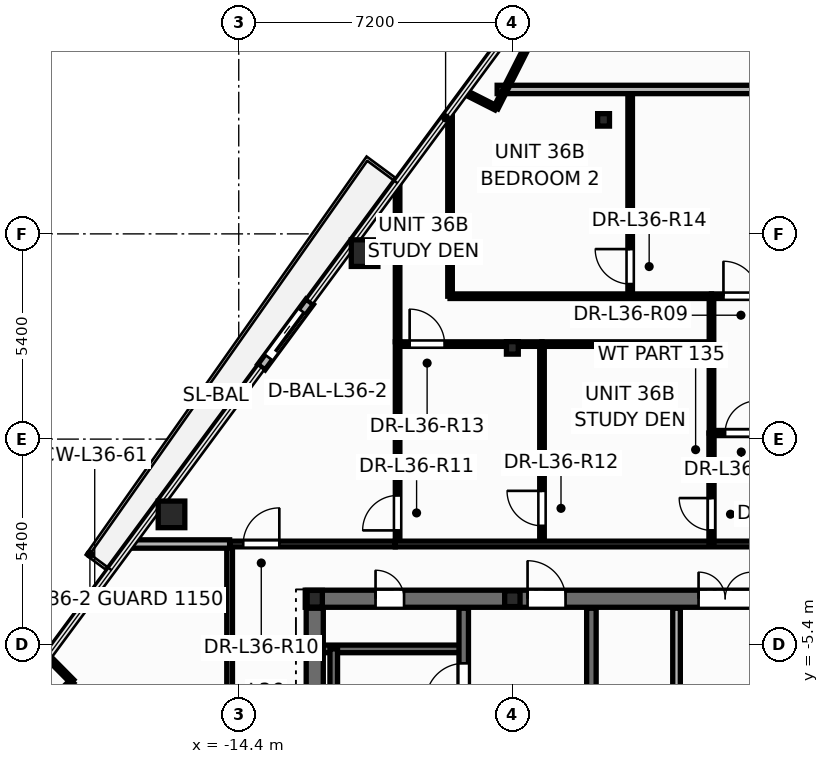
"""IFC4 building model, lengths in metres.
Left out: names, types, materials, properties, quantities, classifications, styles, units other than length and angle.
Written with IfcOpenShell. Run it as: python <this file> out.ifc"""

import sys

from ifc_helpers import new_model, si_unit, direction, frame, frame_2d, origin, origin_2d, place, context, subcontext, project, spatial, rectangle, hollow_circle, i_section, extrude, element, fill, save


model = new_model("IFC4")
c1 = context("Model", 3, precision=1e-05, world=origin(), true_north=direction((0.0, 1.0)))
c2 = subcontext(c1, "Body", "Model", "MODEL_VIEW")
j1 = project(units=[si_unit("LENGTHUNIT", "METRE"), si_unit("PLANEANGLEUNIT", "RADIAN")], contexts=[c1])
p1 = place(None, origin())
s1 = spatial("IfcSite", under=j1, at=p1, CompositionType="ELEMENT")
p2 = place(p1, origin())
s2 = spatial("IfcBuilding", under=s1, at=p2, CompositionType="ELEMENT")
p3 = place(p2, frame((0.0, 0.0, 140.1)))
s3 = spatial("IfcBuildingStorey", under=s2, at=p3, CompositionType="ELEMENT", Elevation=140.1)
for number, where, z_axis, x_axis in (
    (1, (-11.089, 4.894, 0.0), (0.0, 0.0, 1.0), (1.0, 0.0, 0.0)),
    (2, (-16.169, -1.98, 0.0), (0.0, 0.0, 1.0), (1.0, 0.0, 0.0)),
):
    element("IfcColumn", number, at=place(p3, frame(where, z_axis=z_axis, x_axis=x_axis)), inside=s3, PredefinedType="COLUMN", context=c2, shape_type="SweptSolid", body=[
        extrude(hollow_circle(Radius=0.35, WallThickness=0.03, at=origin_2d()), origin(), (0.0, 0.0, 1.0), 3.6),
    ])
p4 = place(p3, frame((-12.4, -4.2, 0.0), z_axis=(0.0, 0.0, 1.0), x_axis=(1.0, 0.0, 0.0)))
e3 = element("IfcColumn", 3, at=p4, inside=s3, PredefinedType="COLUMN", context=c2, shape_type="SweptSolid", body=[
    extrude(i_section(OverallWidth=0.4, OverallDepth=0.44, WebThickness=0.028, FlangeThickness=0.04, at=origin_2d()), origin(), (0.0, 0.0, 1.0), 3.6),
])
p5 = place(p3, frame((-7.2, -4.2, 0.0), z_axis=(0.0, 0.0, 1.0), x_axis=(1.0, 0.0, 0.0)))
e4 = element("IfcColumn", 4, at=p5, inside=s3, PredefinedType="PILASTER", context=c2, shape_type="SweptSolid", body=[
    extrude(i_section(OverallWidth=0.405, OverallDepth=0.414, WebThickness=0.022, FlangeThickness=0.032, at=origin_2d()), origin(), (0.0, 0.0, 1.0), 3.6),
])
for number, where, z_axis, x_axis in (
    (5, (-7.2, 2.4, 0.0), (0.0, 0.0, 1.0), (1.0, 0.0, 0.0)),
    (6, (-4.8, 8.4, 0.0), (0.0, 0.0, 1.0), (1.0, 0.0, 0.0)),
):
    element("IfcColumn", number, at=place(p3, frame(where, z_axis=z_axis, x_axis=x_axis)), inside=s3, PredefinedType="COLUMN", context=c2, shape_type="SweptSolid", body=[
        extrude(i_section(OverallWidth=0.311, OverallDepth=0.327, WebThickness=0.016, FlangeThickness=0.025, at=origin_2d()), origin(), (0.0, 0.0, 1.0), 3.6),
    ])
p6 = place(p3, frame((-12.532, 3.614, -0.015), z_axis=(0.0, 0.0, 1.0), x_axis=(-0.594381437757, -0.804183254271, 0.0)))
e7 = element("IfcWall", 7, at=p6, inside=s3, PredefinedType="STANDARD", context=c2, shape_type="SweptSolid", body=[
    extrude(rectangle(XDim=2.14, YDim=0.24, at=frame_2d((1.07, 0.0))), origin(), (0.0, 0.0, 1.0), 2.807),
])
p7 = place(p6, frame((0.32, 0.0, 0.015)))
e8 = element("IfcOpeningElement", 8, at=p7, cuts=e7, PredefinedType="OPENING", context=c2, shape_type="SweptSolid", body=[
    extrude(rectangle(XDim=1.506, YDim=2.204, at=frame_2d((0.75, 1.102))), frame((0.0, 0.13, 0.0), z_axis=(0.0, -1.0, 0.0), x_axis=(1.0, 0.0, 0.0)), (0.0, 0.0, 1.0), 0.26),
])
p8 = place(p3, frame((-12.65, -4.2, 0.0), z_axis=(0.0, 0.0, 1.0), x_axis=(1.0, 0.0, 0.0)))
e9 = element("IfcWall", 9, at=p8, inside=s3, PredefinedType="SHEAR", context=c2, shape_type="SweptSolid", body=[
    extrude(rectangle(XDim=25.3, YDim=0.45, at=frame_2d((12.65, 0.0))), origin(), (0.0, 0.0, 1.0), 3.6),
])
p9 = place(p8, frame((1.85, 0.0, 0.0)))
e10 = element("IfcOpeningElement", 10, at=p9, cuts=e9, PredefinedType="OPENING", context=c2, shape_type="SweptSolid", body=[
    extrude(rectangle(XDim=0.756, YDim=2.054, at=frame_2d((0.375, 1.027))), frame((0.0, 0.235, 0.0), z_axis=(0.0, -1.0, 0.0), x_axis=(1.0, 0.0, 0.0)), (0.0, 0.0, 1.0), 0.47),
])
p10 = place(p8, frame((22.65, 0.0, 0.0)))
e11 = element("IfcOpeningElement", 11, at=p10, cuts=e9, PredefinedType="OPENING", context=c2, shape_type="SweptSolid", body=[
    extrude(rectangle(XDim=0.756, YDim=2.054, at=frame_2d((0.375, 1.027))), frame((0.0, 0.235, 0.0), z_axis=(0.0, -1.0, 0.0), x_axis=(1.0, 0.0, 0.0)), (0.0, 0.0, 1.0), 0.47),
])
p11 = place(p8, frame((5.85, 0.0, 0.0)))
e12 = element("IfcOpeningElement", 12, at=p11, cuts=e9, PredefinedType="OPENING", context=c2, shape_type="SweptSolid", body=[
    extrude(rectangle(XDim=1.006, YDim=2.104, at=frame_2d((0.5, 1.052))), frame((0.0, 0.235, 0.0), z_axis=(0.0, -1.0, 0.0), x_axis=(1.0, 0.0, 0.0)), (0.0, 0.0, 1.0), 0.47),
])
p12 = place(p8, frame((10.35, 0.0, 0.0)))
e13 = element("IfcOpeningElement", 13, at=p12, cuts=e9, PredefinedType="OPENING", context=c2, shape_type="SweptSolid", body=[
    extrude(rectangle(XDim=1.406, YDim=2.154, at=frame_2d((0.7, 1.077))), frame((0.0, 0.235, 0.0), z_axis=(0.0, -1.0, 0.0), x_axis=(1.0, 0.0, 0.0)), (0.0, 0.0, 1.0), 0.47),
])
p13 = place(p8, frame((18.45, 0.0, 0.0)))
e14 = element("IfcOpeningElement", 14, at=p13, cuts=e9, PredefinedType="OPENING", context=c2, shape_type="SweptSolid", body=[
    extrude(rectangle(XDim=1.006, YDim=2.104, at=frame_2d((0.5, 1.052))), frame((0.0, 0.235, 0.0), z_axis=(0.0, -1.0, 0.0), x_axis=(1.0, 0.0, 0.0)), (0.0, 0.0, 1.0), 0.47),
])
p14 = place(p3, frame((-12.35, -5.52, 0.0), z_axis=(0.0, 0.0, 1.0), x_axis=(1.0, 0.0, 0.0)))
e15 = element("IfcWall", 15, at=p14, inside=s3, PredefinedType="SOLIDWALL", context=c2, shape_type="SweptSolid", body=[
    extrude(rectangle(XDim=3.87, YDim=0.2, at=frame_2d((1.935, 0.0))), origin(), (0.0, 0.0, 1.0), 3.6),
])
p15 = place(p3, frame((-11.9, -13.1, 0.0), z_axis=(0.0, 0.0, 1.0), x_axis=(0.0, 1.0, 0.0)))
e16 = element("IfcWall", 16, at=p15, inside=s3, PredefinedType="SOLIDWALL", context=c2, shape_type="SweptSolid", body=[
    extrude(rectangle(XDim=7.58, YDim=0.2, at=frame_2d((3.79, 0.0))), origin(), (0.0, 0.0, 1.0), 3.6),
])
p16 = place(p3, frame((-8.48, -13.85, 0.0), z_axis=(0.0, 0.0, 1.0), x_axis=(0.0, 1.0, 0.0)))
e17 = element("IfcWall", 17, at=p16, inside=s3, PredefinedType="SHEAR", context=c2, shape_type="SweptSolid", body=[
    extrude(rectangle(XDim=9.4, YDim=0.25, at=frame_2d((4.7, 0.0))), origin(), (0.0, 0.0, 1.0), 3.6),
])
p17 = place(p16, frame((6.95, 0.0, 0.0)))
e18 = element("IfcOpeningElement", 18, at=p17, cuts=e17, PredefinedType="OPENING", context=c2, shape_type="SweptSolid", body=[
    extrude(rectangle(XDim=1.006, YDim=2.104, at=frame_2d((0.5, 1.052))), frame((0.0, 0.135, 0.0), z_axis=(0.0, -1.0, 0.0), x_axis=(1.0, 0.0, 0.0)), (0.0, 0.0, 1.0), 0.27),
])
p18 = place(p3, frame((-5.12, -13.85, 0.0), z_axis=(0.0, 0.0, 1.0), x_axis=(0.0, 1.0, 0.0)))
e19 = element("IfcWall", 19, at=p18, inside=s3, PredefinedType="SHEAR", context=c2, shape_type="SweptSolid", body=[
    extrude(rectangle(XDim=9.4, YDim=0.25, at=frame_2d((4.7, 0.0))), origin(), (0.0, 0.0, 1.0), 3.6),
])
p19 = place(p3, frame((-12.4, -13.85, 0.0), z_axis=(0.0, 0.0, 1.0), x_axis=(0.0, 1.0, 0.0)))
e20 = element("IfcWall", 20, at=p19, inside=s3, PredefinedType="SHEAR", context=c2, shape_type="SweptSolid", body=[
    extrude(rectangle(XDim=9.4, YDim=0.45, at=frame_2d((4.7, 0.0))), origin(), (0.0, 0.0, 1.0), 3.6),
])
p20 = place(p3, frame((-2.88, -9.45, 0.0), z_axis=(0.0, 0.0, 1.0), x_axis=(0.0, 1.0, 0.0)))
e21 = element("IfcWall", 21, at=p20, inside=s3, PredefinedType="SOLIDWALL", context=c2, shape_type="SweptSolid", body=[
    extrude(rectangle(XDim=5.0, YDim=0.2, at=frame_2d((2.5, 0.0))), origin(), (0.0, 0.0, 1.0), 3.35),
])
p21 = place(p20, frame((2.05, 0.0, 0.0)))
e22 = element("IfcOpeningElement", 22, at=p21, cuts=e21, PredefinedType="OPENING", context=c2, shape_type="SweptSolid", body=[
    extrude(rectangle(XDim=0.926, YDim=2.104, at=frame_2d((0.46, 1.052))), frame((0.0, 0.11, 0.0), z_axis=(0.0, -1.0, 0.0), x_axis=(1.0, 0.0, 0.0)), (0.0, 0.0, 1.0), 0.22),
])
p22 = place(p3, frame((-14.64, -10.8, 0.0), z_axis=(0.0, 0.0, 1.0), x_axis=(0.0, 1.0, 0.0)))
e23 = element("IfcWall", 23, at=p22, inside=s3, PredefinedType="PARTITIONING", context=c2, shape_type="SweptSolid", body=[
    extrude(rectangle(XDim=8.04, YDim=0.15, at=frame_2d((4.02, 0.0))), origin(), (0.0, 0.0, 1.0), 2.325),
])
p23 = place(p22, frame((0.359, 0.0, 0.0)))
e24 = element("IfcOpeningElement", 24, at=p23, cuts=e23, PredefinedType="OPENING", context=c2, shape_type="SweptSolid", body=[
    extrude(rectangle(XDim=0.956, YDim=2.104, at=frame_2d((0.475, 1.052))), frame((0.0, 0.085, 0.0), z_axis=(0.0, -1.0, 0.0), x_axis=(1.0, 0.0, 0.0)), (0.0, 0.0, 1.0), 0.17),
])
p24 = place(p3, frame((-4.1, 3.76, 0.0), z_axis=(0.0, 0.0, 1.0), x_axis=(0.0, 1.0, 0.0)))
e25 = element("IfcWall", 25, at=p24, inside=s3, PredefinedType="PARTITIONING", context=c2, shape_type="SweptSolid", body=[
    extrude(rectangle(XDim=5.44, YDim=0.12, at=frame_2d((2.72, 0.0))), origin(), (0.0, 0.0, 1.0), 2.325),
])
p25 = place(p24, frame((0.32, 0.0, 0.0)))
e26 = element("IfcOpeningElement", 26, at=p25, cuts=e25, PredefinedType="OPENING", context=c2, shape_type="SweptSolid", body=[
    extrude(rectangle(XDim=0.926, YDim=2.104, at=frame_2d((0.46, 1.052))), frame((0.0, 0.07, 0.0), z_axis=(0.0, -1.0, 0.0), x_axis=(1.0, 0.0, 0.0)), (0.0, 0.0, 1.0), 0.14),
])
p26 = place(p3, frame((-10.22, -2.76, 0.0), z_axis=(0.0, 0.0, 1.0), x_axis=(0.0, 1.0, 0.0)))
e27 = element("IfcWall", 27, at=p26, inside=s3, PredefinedType="PARTITIONING", context=c2, shape_type="SweptSolid", body=[
    extrude(rectangle(XDim=5.32, YDim=0.12, at=frame_2d((2.66, 0.0))), origin(), (0.0, 0.0, 1.0), 2.325),
])
p27 = place(p26, frame((0.358, 0.0, 0.0)))
e28 = element("IfcOpeningElement", 28, at=p27, cuts=e27, PredefinedType="OPENING", context=c2, shape_type="SweptSolid", body=[
    extrude(rectangle(XDim=0.926, YDim=2.104, at=frame_2d((0.46, 1.052))), frame((0.0, 0.07, 0.0), z_axis=(0.0, -1.0, 0.0), x_axis=(1.0, 0.0, 0.0)), (0.0, 0.0, 1.0), 0.14),
])
p28 = place(p3, frame((-6.42, -2.76, 0.0), z_axis=(0.0, 0.0, 1.0), x_axis=(0.0, 1.0, 0.0)))
e29 = element("IfcWall", 29, at=p28, inside=s3, PredefinedType="PARTITIONING", context=c2, shape_type="SweptSolid", body=[
    extrude(rectangle(XDim=5.26, YDim=0.12, at=frame_2d((2.63, 0.0))), origin(), (0.0, 0.0, 1.0), 2.325),
])
p29 = place(p28, frame((0.478, 0.0, 0.0)))
e30 = element("IfcOpeningElement", 30, at=p29, cuts=e29, PredefinedType="OPENING", context=c2, shape_type="SweptSolid", body=[
    extrude(rectangle(XDim=0.926, YDim=2.104, at=frame_2d((0.46, 1.052))), frame((0.0, 0.07, 0.0), z_axis=(0.0, -1.0, 0.0), x_axis=(1.0, 0.0, 0.0)), (0.0, 0.0, 1.0), 0.14),
])
p30 = place(p3, frame((-8.84, 3.76, 0.0), z_axis=(0.0, 0.0, 1.0), x_axis=(0.0, 1.0, 0.0)))
e31 = element("IfcWall", 31, at=p30, inside=s3, PredefinedType="PARTITIONING", context=c2, shape_type="SweptSolid", body=[
    extrude(rectangle(XDim=4.849, YDim=0.12, at=frame_2d((2.425, 0.0))), origin(), (0.0, 0.0, 1.0), 2.325),
])
p31 = place(p3, frame((-8.84, 3.76, 0.0), z_axis=(0.0, 0.0, 1.0), x_axis=(1.0, 0.0, 0.0)))
e32 = element("IfcWall", 32, at=p31, inside=s3, PredefinedType="PARTITIONING", context=c2, shape_type="SweptSolid", body=[
    extrude(rectangle(XDim=6.88, YDim=0.12, at=frame_2d((3.44, 0.0))), origin(), (0.0, 0.0, 1.0), 2.325),
])
p32 = place(p3, frame((-7.6, 9.2, 0.0), z_axis=(0.0, 0.0, 1.0), x_axis=(1.0, 0.0, 0.0)))
e33 = element("IfcWall", 33, at=p32, inside=s3, PredefinedType="PARTITIONING", context=c2, shape_type="SweptSolid", body=[
    extrude(rectangle(XDim=8.24, YDim=0.22, at=frame_2d((4.12, 0.0))), origin(), (0.0, 0.0, 1.0), 2.325),
])
p33 = place(p3, frame((-10.28, -2.76, 0.0), z_axis=(0.0, 0.0, 1.0), x_axis=(1.0, 0.0, 0.0)))
e34 = element("IfcWall", 34, at=p33, inside=s3, PredefinedType="PARTITIONING", context=c2, shape_type="SweptSolid", body=[
    extrude(rectangle(XDim=10.92, YDim=0.15, at=frame_2d((5.46, 0.0))), origin(), (0.0, 0.0, 1.0), 2.325),
])
p34 = place(p3, frame((-14.64, -2.76, 0.0), z_axis=(0.0, 0.0, 1.0), x_axis=(1.0, 0.0, 0.0)))
e35 = element("IfcWall", 35, at=p34, inside=s3, PredefinedType="PARTITIONING", context=c2, shape_type="SweptSolid", body=[
    extrude(rectangle(XDim=4.358, YDim=0.15, at=frame_2d((2.179, 0.0))), origin(), (0.0, 0.0, 1.0), 3.35),
])
p35 = place(p34, frame((0.358, 0.0, 0.0)))
e36 = element("IfcOpeningElement", 36, at=p35, cuts=e35, PredefinedType="OPENING", context=c2, shape_type="SweptSolid", body=[
    extrude(rectangle(XDim=0.956, YDim=2.104, at=frame_2d((0.475, 1.052))), frame((0.0, 0.085, 0.0), z_axis=(0.0, -1.0, 0.0), x_axis=(1.0, 0.0, 0.0)), (0.0, 0.0, 1.0), 0.17),
])
p36 = place(p3, frame((-6.42, 2.5, 0.0), z_axis=(0.0, 0.0, 1.0), x_axis=(1.0, 0.0, 0.0)))
e37 = element("IfcWall", 37, at=p36, inside=s3, PredefinedType="PARTITIONING", context=c2, shape_type="SweptSolid", body=[
    extrude(rectangle(XDim=4.46, YDim=0.12, at=frame_2d((2.23, 0.0))), origin(), (0.0, 0.0, 1.0), 2.325),
])
p37 = place(p3, frame((-10.22, 2.562, 0.0), z_axis=(0.0, 0.0, 1.0), x_axis=(0.0, 1.0, 0.0)))
e38 = element("IfcWall", 38, at=p37, inside=s3, PredefinedType="PARTITIONING", context=c2, shape_type="SweptSolid", body=[
    extrude(rectangle(XDim=4.18, YDim=0.12, at=frame_2d((2.09, 0.0))), origin(), (0.0, 0.0, 1.0), 2.325),
])
p38 = place(p3, frame((-10.22, 2.5, 0.0), z_axis=(0.0, 0.0, 1.0), x_axis=(1.0, 0.0, 0.0)))
e39 = element("IfcWall", 39, at=p38, inside=s3, PredefinedType="PARTITIONING", context=c2, shape_type="SweptSolid", body=[
    extrude(rectangle(XDim=3.8, YDim=0.12, at=frame_2d((1.9, 0.0))), origin(), (0.0, 0.0, 1.0), 2.325),
])
p39 = place(p38, frame((0.317, 0.0, 0.0)))
e40 = element("IfcOpeningElement", 40, at=p39, cuts=e39, PredefinedType="OPENING", context=c2, shape_type="SweptSolid", body=[
    extrude(rectangle(XDim=0.926, YDim=2.104, at=frame_2d((0.46, 1.052))), frame((0.0, 0.07, 0.0), z_axis=(0.0, -1.0, 0.0), x_axis=(1.0, 0.0, 0.0)), (0.0, 0.0, 1.0), 0.14),
])
p40 = place(p3, frame((-1.96, -2.76, 0.0), z_axis=(0.0, 0.0, 1.0), x_axis=(0.0, 1.0, 0.0)))
e41 = element("IfcWall", 41, at=p40, inside=s3, PredefinedType="PARTITIONING", context=c2, shape_type="SweptSolid", body=[
    extrude(rectangle(XDim=2.92, YDim=0.135, at=frame_2d((1.46, 0.0))), origin(), (0.0, 0.0, 1.0), 3.35),
])
p41 = place(p40, frame((0.359, 0.0, 0.0)))
e42 = element("IfcOpeningElement", 42, at=p41, cuts=e41, PredefinedType="OPENING", context=c2, shape_type="SweptSolid", body=[
    extrude(rectangle(XDim=0.856, YDim=2.104, at=frame_2d((0.425, 1.052))), frame((0.0, 0.078, 0.0), z_axis=(0.0, -1.0, 0.0), x_axis=(1.0, 0.0, 0.0)), (0.0, 0.0, 1.0), 0.155),
])
p42 = place(p3, frame((-17.243, -2.76, 0.0), z_axis=(0.0, 0.0, 1.0), x_axis=(1.0, 0.0, 0.0)))
e43 = element("IfcWall", 43, at=p42, inside=s3, PredefinedType="PARTITIONING", context=c2, shape_type="SweptSolid", body=[
    extrude(rectangle(XDim=2.603, YDim=0.22, at=frame_2d((1.301, 0.0))), origin(), (0.0, 0.0, 1.0), 2.792),
])
p43 = place(p3, frame((-1.96, 0.16, 0.0), z_axis=(0.0, 0.0, 1.0), x_axis=(1.0, 0.0, 0.0)))
e44 = element("IfcWall", 44, at=p43, inside=s3, PredefinedType="PARTITIONING", context=c2, shape_type="SweptSolid", body=[
    extrude(rectangle(XDim=2.6, YDim=0.135, at=frame_2d((1.3, 0.0))), origin(), (0.0, 0.0, 1.0), 2.325),
])
p44 = place(p43, frame((0.358, 0.0, 0.0)))
e45 = element("IfcOpeningElement", 45, at=p44, cuts=e44, PredefinedType="OPENING", context=c2, shape_type="SweptSolid", body=[
    extrude(rectangle(XDim=0.856, YDim=2.104, at=frame_2d((0.425, 1.052))), frame((0.0, 0.078, 0.0), z_axis=(0.0, -1.0, 0.0), x_axis=(1.0, 0.0, 0.0)), (0.0, 0.0, 1.0), 0.155),
])
p45 = place(p3, frame((-1.96, 3.76, 0.0), z_axis=(0.0, 0.0, 1.0), x_axis=(1.0, 0.0, 0.0)))
e46 = element("IfcWall", 46, at=p45, inside=s3, PredefinedType="PARTITIONING", context=c2, shape_type="SweptSolid", body=[
    extrude(rectangle(XDim=2.6, YDim=0.12, at=frame_2d((1.3, 0.0))), origin(), (0.0, 0.0, 1.0), 2.325),
])
p46 = place(p45, frame((0.315, 0.0, 0.0)))
e47 = element("IfcOpeningElement", 47, at=p46, cuts=e46, PredefinedType="OPENING", context=c2, shape_type="SweptSolid", body=[
    extrude(rectangle(XDim=0.926, YDim=2.104, at=frame_2d((0.46, 1.052))), frame((0.0, 0.07, 0.0), z_axis=(0.0, -1.0, 0.0), x_axis=(1.0, 0.0, 0.0)), (0.0, 0.0, 1.0), 0.14),
])
p47 = place(p3, frame((-1.96, 0.16, 0.0), z_axis=(0.0, 0.0, 1.0), x_axis=(0.0, 1.0, 0.0)))
e48 = element("IfcWall", 48, at=p47, inside=s3, PredefinedType="PARTITIONING", context=c2, shape_type="SweptSolid", body=[
    extrude(rectangle(XDim=3.6, YDim=0.12, at=frame_2d((1.8, 0.0))), origin(), (0.0, 0.0, 1.0), 2.325),
])
p48 = place(p3, frame((-18.784, -6.374, 0.0), z_axis=(0.0, 0.0, 1.0), x_axis=(-0.71069096923, -0.70350433279, 0.0)))
e49 = element("IfcWall", 49, at=p48, inside=s3, PredefinedType="PARTITIONING", context=c2, shape_type="SweptSolid", body=[
    extrude(rectangle(XDim=2.174, YDim=0.12, at=frame_2d((1.087, 0.0))), origin(), (0.0, 0.0, 1.0), 3.35),
])
p49 = place(p3, frame((-6.702, 10.553, 0.0), z_axis=(0.0, 0.0, 1.0), x_axis=(-0.451617656026, -0.892211573992, 0.0)))
e50 = element("IfcWall", 50, at=p49, inside=s3, PredefinedType="PARTITIONING", context=c2, shape_type="SweptSolid", body=[
    extrude(rectangle(XDim=2.06, YDim=0.12, at=frame_2d((1.03, 0.0))), origin(), (0.0, 0.0, 1.0), 3.35),
])
p50 = place(p3, frame((-7.632, 8.716, 0.0), z_axis=(0.0, 0.0, 1.0), x_axis=(-0.892273316606, 0.451495657202, 0.0)))
e51 = element("IfcWall", 51, at=p50, inside=s3, PredefinedType="PARTITIONING", context=c2, shape_type="SweptSolid", body=[
    extrude(rectangle(XDim=0.911, YDim=0.12, at=frame_2d((0.456, 0.0))), origin(), (0.0, 0.0, 1.0), 2.792),
])
p51 = place(p3, frame((-19.424, -5.728, 0.0), z_axis=(0.0, 0.0, 1.0), x_axis=(0.703469957503, -0.710724995262, 0.0)))
e52 = element("IfcWall", 52, at=p51, inside=s3, PredefinedType="PARTITIONING", context=c2, shape_type="SweptSolid", body=[
    extrude(rectangle(XDim=0.909, YDim=0.12, at=frame_2d((0.454, 0.0))), origin(), (0.0, 0.0, 1.0), 2.792),
])
p52 = place(p7, origin())
e53 = element("IfcDoor", 53, at=p52, inside=s3, OperationType="SLIDING_TO_RIGHT", PredefinedType="DOOR", context=c2, shape_type="SweptSolid", body=[
    extrude(rectangle(XDim=1.5, YDim=2.2, at=frame_2d((0.75, 1.1))), frame((0.0, 0.025, 0.0), z_axis=(0.0, -1.0, 0.0), x_axis=(1.0, 0.0, 0.0)), (0.0, 0.0, 1.0), 0.05),
])
fill(e8, e53)
p53 = place(p17, origin())
e54 = element("IfcDoor", 54, at=p53, inside=s3, OperationType="SINGLE_SWING_LEFT", PredefinedType="DOOR", context=c2, shape_type="SweptSolid", body=[
    extrude(rectangle(XDim=1.0, YDim=2.1, at=frame_2d((0.5, 1.05))), frame((0.0, 0.025, 0.0), z_axis=(0.0, -1.0, 0.0), x_axis=(1.0, 0.0, 0.0)), (0.0, 0.0, 1.0), 0.05),
])
fill(e18, e54)
p54 = place(p9, origin())
e55 = element("IfcDoor", 55, at=p54, inside=s3, OperationType="SINGLE_SWING_LEFT", PredefinedType="DOOR", context=c2, shape_type="SweptSolid", body=[
    extrude(rectangle(XDim=0.75, YDim=2.05, at=frame_2d((0.375, 1.025))), frame((0.0, 0.025, 0.0), z_axis=(0.0, -1.0, 0.0), x_axis=(1.0, 0.0, 0.0)), (0.0, 0.0, 1.0), 0.05),
])
fill(e10, e55)
p55 = place(p11, origin())
e56 = element("IfcDoor", 56, at=p55, inside=s3, OperationType="SINGLE_SWING_LEFT", PredefinedType="DOOR", context=c2, shape_type="SweptSolid", body=[
    extrude(rectangle(XDim=1.0, YDim=2.1, at=frame_2d((0.5, 1.05))), frame((0.0, 0.025, 0.0), z_axis=(0.0, -1.0, 0.0), x_axis=(1.0, 0.0, 0.0)), (0.0, 0.0, 1.0), 0.05),
])
fill(e12, e56)
p56 = place(p12, origin())
e57 = element("IfcDoor", 57, at=p56, inside=s3, OperationType="DOUBLE_DOOR_SINGLE_SWING", PredefinedType="DOOR", context=c2, shape_type="SweptSolid", body=[
    extrude(rectangle(XDim=1.4, YDim=2.15, at=frame_2d((0.7, 1.075))), frame((0.0, 0.025, 0.0), z_axis=(0.0, -1.0, 0.0), x_axis=(1.0, 0.0, 0.0)), (0.0, 0.0, 1.0), 0.05),
])
fill(e13, e57)
p57 = place(p44, origin())
e58 = element("IfcDoor", 58, at=p57, inside=s3, OperationType="SINGLE_SWING_RIGHT", PredefinedType="DOOR", context=c2, shape_type="SweptSolid", body=[
    extrude(rectangle(XDim=0.85, YDim=2.1, at=frame_2d((0.425, 1.05))), frame((0.0, 0.025, 0.0), z_axis=(0.0, -1.0, 0.0), x_axis=(1.0, 0.0, 0.0)), (0.0, 0.0, 1.0), 0.05),
])
fill(e45, e58)
p58 = place(p46, origin())
e59 = element("IfcDoor", 59, at=p58, inside=s3, OperationType="SINGLE_SWING_LEFT", PredefinedType="DOOR", context=c2, shape_type="SweptSolid", body=[
    extrude(rectangle(XDim=0.92, YDim=2.1, at=frame_2d((0.46, 1.05))), frame((0.0, 0.025, 0.0), z_axis=(0.0, -1.0, 0.0), x_axis=(1.0, 0.0, 0.0)), (0.0, 0.0, 1.0), 0.05),
])
fill(e47, e59)
p59 = place(p35, origin())
e60 = element("IfcDoor", 60, at=p59, inside=s3, OperationType="SINGLE_SWING_RIGHT", PredefinedType="DOOR", context=c2, shape_type="SweptSolid", body=[
    extrude(rectangle(XDim=0.95, YDim=2.1, at=frame_2d((0.475, 1.05))), frame((0.0, 0.025, 0.0), z_axis=(0.0, -1.0, 0.0), x_axis=(1.0, 0.0, 0.0)), (0.0, 0.0, 1.0), 0.05),
])
fill(e36, e60)
p60 = place(p27, origin())
e61 = element("IfcDoor", 61, at=p60, inside=s3, OperationType="SINGLE_SWING_LEFT", PredefinedType="DOOR", context=c2, shape_type="SweptSolid", body=[
    extrude(rectangle(XDim=0.92, YDim=2.1, at=frame_2d((0.46, 1.05))), frame((0.0, 0.025, 0.0), z_axis=(0.0, -1.0, 0.0), x_axis=(1.0, 0.0, 0.0)), (0.0, 0.0, 1.0), 0.05),
])
fill(e28, e61)
p61 = place(p29, origin())
e62 = element("IfcDoor", 62, at=p61, inside=s3, OperationType="SINGLE_SWING_RIGHT", PredefinedType="DOOR", context=c2, shape_type="SweptSolid", body=[
    extrude(rectangle(XDim=0.92, YDim=2.1, at=frame_2d((0.46, 1.05))), frame((0.0, 0.025, 0.0), z_axis=(0.0, -1.0, 0.0), x_axis=(1.0, 0.0, 0.0)), (0.0, 0.0, 1.0), 0.05),
])
fill(e30, e62)
p62 = place(p39, origin())
e63 = element("IfcDoor", 63, at=p62, inside=s3, OperationType="SINGLE_SWING_LEFT", PredefinedType="DOOR", context=c2, shape_type="SweptSolid", body=[
    extrude(rectangle(XDim=0.92, YDim=2.1, at=frame_2d((0.46, 1.05))), frame((0.0, 0.025, 0.0), z_axis=(0.0, -1.0, 0.0), x_axis=(1.0, 0.0, 0.0)), (0.0, 0.0, 1.0), 0.05),
])
fill(e40, e63)
p63 = place(p25, origin())
e64 = element("IfcDoor", 64, at=p63, inside=s3, OperationType="SINGLE_SWING_RIGHT", PredefinedType="DOOR", context=c2, shape_type="SweptSolid", body=[
    extrude(rectangle(XDim=0.92, YDim=2.1, at=frame_2d((0.46, 1.05))), frame((0.0, 0.025, 0.0), z_axis=(0.0, -1.0, 0.0), x_axis=(1.0, 0.0, 0.0)), (0.0, 0.0, 1.0), 0.05),
])
fill(e26, e64)
p64 = place(p41, origin())
e65 = element("IfcDoor", 65, at=p64, inside=s3, OperationType="SINGLE_SWING_RIGHT", PredefinedType="DOOR", context=c2, shape_type="SweptSolid", body=[
    extrude(rectangle(XDim=0.85, YDim=2.1, at=frame_2d((0.425, 1.05))), frame((0.0, 0.025, 0.0), z_axis=(0.0, -1.0, 0.0), x_axis=(1.0, 0.0, 0.0)), (0.0, 0.0, 1.0), 0.05),
])
fill(e42, e65)
save(model, sys.argv[1])
